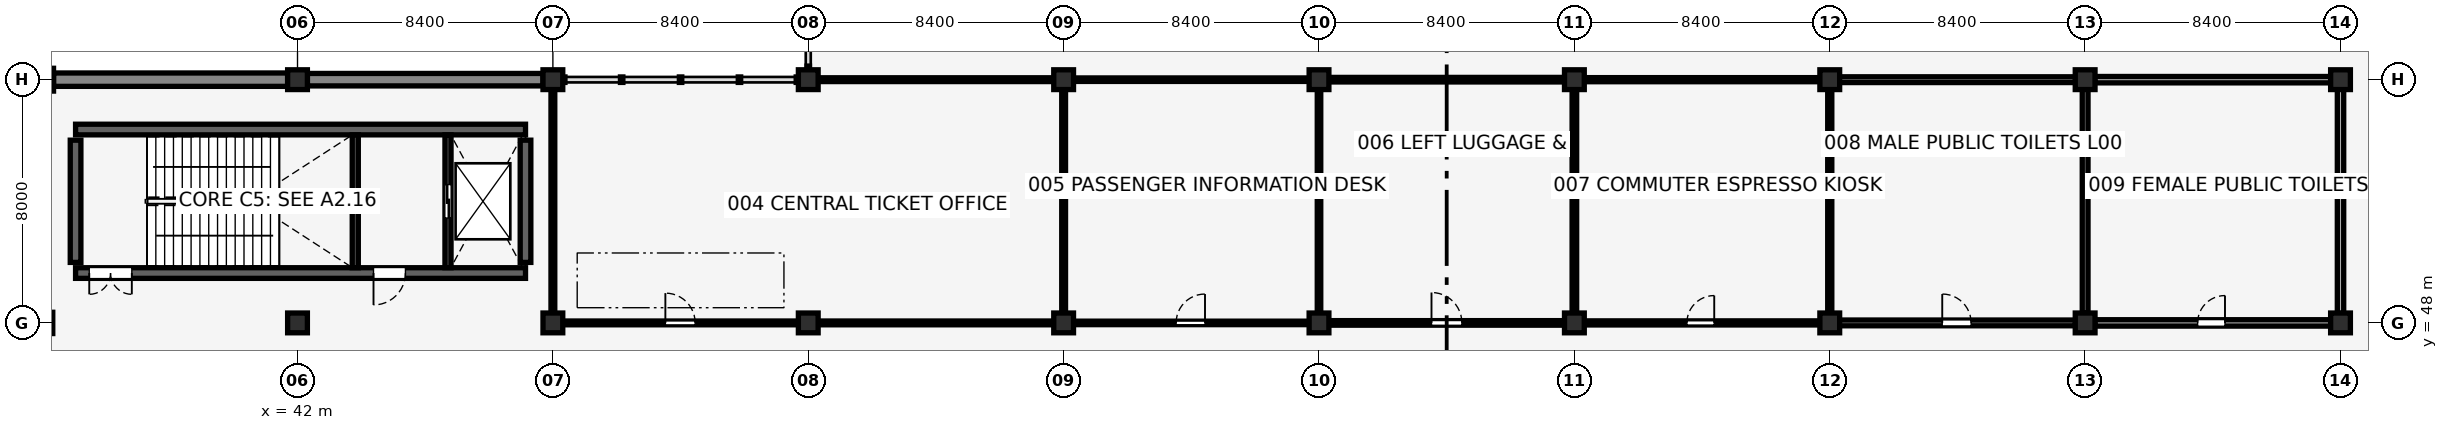
"""IFC4 building model, lengths in metres.
Left out: names, types, materials, properties, quantities, classifications, styles, units other than length and angle.
Written with IfcOpenShell. Run it as: python <this file> out.ifc"""

import sys

from ifc_helpers import new_model, si_unit, direction, frame, frame_2d, origin, origin_2d, place, context, subcontext, project, spatial, rectangle, circle, extrude, element, fill, save


model = new_model("IFC4")
c1 = context("Model", 3, precision=1e-05, world=origin(), true_north=direction((0.0, 1.0)))
c2 = subcontext(c1, "Body", "Model", "MODEL_VIEW")
j1 = project(units=[si_unit("LENGTHUNIT", "METRE"), si_unit("PLANEANGLEUNIT", "RADIAN")], contexts=[c1])
p1 = place(None, origin())
s1 = spatial("IfcSite", under=j1, at=p1, CompositionType="ELEMENT")
p2 = place(p1, origin())
s2 = spatial("IfcBuilding", under=s1, at=p2, CompositionType="ELEMENT")
p3 = place(p2, origin())
s3 = spatial("IfcBuildingStorey", under=s2, at=p3, CompositionType="ELEMENT", Elevation=0.0)
p4 = place(p3, frame((34.7, 49.64, 0.0), z_axis=(0.0, 0.0, 1.0), x_axis=(1.0, 0.0, 0.0)))
e1 = element("IfcWall", 1, at=p4, inside=s3, PredefinedType="SHEAR", context=c2, shape_type="SweptSolid", body=[
    extrude(rectangle(XDim=14.8, YDim=0.35, at=frame_2d((7.4, 0.0))), origin(), (0.0, 0.0, 1.0), 5.15),
])
p5 = place(p4, frame((1.85, 0.0, 0.0), z_axis=(0.0, 0.0, 1.0), x_axis=(-1.0, 0.0, 0.0)))
e2 = element("IfcOpeningElement", 2, at=p5, cuts=e1, PredefinedType="OPENING", context=c2, shape_type="SweptSolid", body=[
    extrude(rectangle(XDim=1.4, YDim=2.15, at=frame_2d((0.7, 1.075))), frame((0.0, 0.185, 0.0), z_axis=(0.0, -1.0, 0.0), x_axis=(1.0, 0.0, 0.0)), (0.0, 0.0, 1.0), 0.37),
])
p6 = place(p4, frame((10.85, 0.0, 0.0), z_axis=(0.0, 0.0, 1.0), x_axis=(-1.0, 0.0, 0.0)))
e3 = element("IfcOpeningElement", 3, at=p6, cuts=e1, PredefinedType="OPENING", context=c2, shape_type="SweptSolid", body=[
    extrude(rectangle(XDim=1.05, YDim=2.15, at=frame_2d((0.525, 1.075))), frame((0.0, 0.185, 0.0), z_axis=(0.0, -1.0, 0.0), x_axis=(1.0, 0.0, 0.0)), (0.0, 0.0, 1.0), 0.37),
])
p7 = place(p3, frame((34.7, 54.36, 0.0), z_axis=(0.0, 0.0, 1.0), x_axis=(1.0, 0.0, 0.0)))
e4 = element("IfcWall", 4, at=p7, inside=s3, PredefinedType="SHEAR", context=c2, shape_type="SweptSolid", body=[
    extrude(rectangle(XDim=14.8, YDim=0.35, at=frame_2d((7.4, 0.0))), origin(), (0.0, 0.0, 1.0), 5.15),
])
for number, where, z_axis, x_axis in (
    (5, (34.7, 49.99, 0.0), (0.0, 0.0, 1.0), (0.0, 1.0, 0.0)),
    (6, (49.5, 49.99, 0.0), (0.0, 0.0, 1.0), (0.0, 1.0, 0.0)),
):
    element("IfcWall", number, at=place(p3, frame(where, z_axis=z_axis, x_axis=x_axis)), inside=s3, PredefinedType="SHEAR", context=c2, shape_type="SweptSolid", body=[
        extrude(rectangle(XDim=4.02, YDim=0.35, at=frame_2d((2.01, 0.0))), origin(), (0.0, 0.0, 1.0), 5.15),
    ])
p8 = place(p3, frame((33.6, 48.0, 0.0), z_axis=(0.0, 0.0, 1.0), x_axis=(1.0, 0.0, 0.0)))
e7 = element("IfcColumn", 7, at=p8, inside=s3, PredefinedType="COLUMN", context=c2, shape_type="SweptSolid", body=[
    extrude(rectangle(XDim=0.7, YDim=0.7, at=origin_2d()), origin(), (0.0, 0.0, 1.0), 5.15),
])
p9 = place(p3, frame((33.6, 56.0, 0.0), z_axis=(0.0, 0.0, 1.0), x_axis=(1.0, 0.0, 0.0)))
e8 = element("IfcColumn", 8, at=p9, inside=s3, PredefinedType="COLUMN", context=c2, shape_type="SweptSolid", body=[
    extrude(rectangle(XDim=0.75, YDim=0.75, at=origin_2d()), origin(), (0.0, 0.0, 1.0), 5.15),
])
for number, where, z_axis, x_axis in (
    (9, (42.0, 48.0, 0.0), (0.0, 0.0, 1.0), (1.0, 0.0, 0.0)),
    (10, (42.0, 56.0, 0.0), (0.0, 0.0, 1.0), (1.0, 0.0, 0.0)),
    (11, (50.4, 48.0, 0.0), (0.0, 0.0, 1.0), (1.0, 0.0, 0.0)),
    (12, (50.4, 56.0, 0.0), (0.0, 0.0, 1.0), (1.0, 0.0, 0.0)),
    (13, (58.8, 48.0, 0.0), (0.0, 0.0, 1.0), (1.0, 0.0, 0.0)),
    (14, (58.8, 56.0, 0.0), (0.0, 0.0, 1.0), (1.0, 0.0, 0.0)),
    (15, (67.2, 48.0, 0.0), (0.0, 0.0, 1.0), (1.0, 0.0, 0.0)),
    (16, (67.2, 56.0, 0.0), (0.0, 0.0, 1.0), (1.0, 0.0, 0.0)),
    (17, (75.6, 48.0, 0.0), (0.0, 0.0, 1.0), (1.0, 0.0, 0.0)),
    (18, (75.6, 56.0, 0.0), (0.0, 0.0, 1.0), (1.0, 0.0, 0.0)),
    (19, (84.0, 48.0, 0.0), (0.0, 0.0, 1.0), (1.0, 0.0, 0.0)),
    (20, (84.0, 56.0, 0.0), (0.0, 0.0, 1.0), (1.0, 0.0, 0.0)),
    (21, (92.4, 48.0, 0.0), (0.0, 0.0, 1.0), (1.0, 0.0, 0.0)),
    (22, (92.4, 56.0, 0.0), (0.0, 0.0, 1.0), (1.0, 0.0, 0.0)),
    (23, (100.8, 48.0, 0.0), (0.0, 0.0, 1.0), (1.0, 0.0, 0.0)),
    (24, (100.8, 56.0, 0.0), (0.0, 0.0, 1.0), (1.0, 0.0, 0.0)),
    (25, (109.2, 48.0, 0.0), (0.0, 0.0, 1.0), (1.0, 0.0, 0.0)),
    (26, (109.2, 56.0, 0.0), (0.0, 0.0, 1.0), (1.0, 0.0, 0.0)),
):
    element("IfcColumn", number, at=place(p3, frame(where, z_axis=z_axis, x_axis=x_axis)), inside=s3, PredefinedType="COLUMN", context=c2, shape_type="SweptSolid", body=[
        extrude(circle(Radius=0.325, at=origin_2d()), origin(), (0.0, 0.0, 1.0), 5.15),
    ])
p10 = place(p3, frame((33.975, 56.0, 0.0), z_axis=(0.0, 0.0, 1.0), x_axis=(1.0, 0.0, 0.0)))
e27 = element("IfcWall", 27, at=p10, inside=s3, PredefinedType="SOLIDWALL", context=c2, shape_type="SweptSolid", body=[
    extrude(rectangle(XDim=7.7, YDim=0.44, at=frame_2d((3.85, 0.0))), origin(), (0.0, 0.0, 1.0), 4.74),
])
p11 = place(p3, frame((42.325, 56.0, 0.0), z_axis=(0.0, 0.0, 1.0), x_axis=(1.0, 0.0, 0.0)))
e28 = element("IfcWall", 28, at=p11, inside=s3, PredefinedType="SOLIDWALL", context=c2, shape_type="SweptSolid", body=[
    extrude(rectangle(XDim=7.75, YDim=0.41, at=frame_2d((3.875, 0.0))), origin(), (0.0, 0.0, 1.0), 4.74),
])
p12 = place(p3, frame((43.9, 49.815, 0.0), z_axis=(0.0, 0.0, 1.0), x_axis=(0.0, 1.0, 0.0)))
e29 = element("IfcWall", 29, at=p12, inside=s3, PredefinedType="SHEAR", context=c2, shape_type="SweptSolid", body=[
    extrude(rectangle(XDim=4.37, YDim=0.2, at=frame_2d((2.185, 0.0))), origin(), (0.0, 0.0, 1.0), 5.15),
])
p13 = place(p3, frame((46.95, 49.815, 0.0), z_axis=(0.0, 0.0, 1.0), x_axis=(0.0, 1.0, 0.0)))
e30 = element("IfcWall", 30, at=p13, inside=s3, PredefinedType="SHEAR", context=c2, shape_type="SweptSolid", body=[
    extrude(rectangle(XDim=4.37, YDim=0.2, at=frame_2d((2.185, 0.0))), origin(), (0.0, 0.0, 1.0), 5.15),
])
p14 = place(p13, frame((1.635, 0.0, 0.0), z_axis=(0.0, 0.0, 1.0), x_axis=(1.0, 0.0, 0.0)))
e31 = element("IfcOpeningElement", 31, at=p14, cuts=e30, PredefinedType="OPENING", context=c2, shape_type="SweptSolid", body=[
    extrude(rectangle(XDim=1.1, YDim=2.15, at=frame_2d((0.55, 1.075))), frame((0.0, 0.11, 0.0), z_axis=(0.0, -1.0, 0.0), x_axis=(1.0, 0.0, 0.0)), (0.0, 0.0, 1.0), 0.22),
])
p15 = place(p3, frame((50.715, 48.0, 0.0), z_axis=(0.0, 0.0, 1.0), x_axis=(1.0, 0.0, 0.0)))
e32 = element("IfcWall", 32, at=p15, inside=s3, PredefinedType="PARTITIONING", context=c2, shape_type="SweptSolid", body=[
    extrude(rectangle(XDim=7.77, YDim=0.125, at=frame_2d((3.885, 0.0))), origin(), (0.0, 0.0, 1.0), 4.605),
])
p16 = place(p15, frame((3.385, 0.0, 0.0), z_axis=(0.0, 0.0, 1.0), x_axis=(1.0, 0.0, 0.0)))
e33 = element("IfcOpeningElement", 33, at=p16, cuts=e32, PredefinedType="OPENING", context=c2, shape_type="SweptSolid", body=[
    extrude(rectangle(XDim=0.98, YDim=2.15, at=frame_2d((0.49, 1.075))), frame((0.0, 0.073, 0.0), z_axis=(0.0, -1.0, 0.0), x_axis=(1.0, 0.0, 0.0)), (0.0, 0.0, 1.0), 0.145),
])
p17 = place(p3, frame((67.515, 48.0, 0.0), z_axis=(0.0, 0.0, 1.0), x_axis=(1.0, 0.0, 0.0)))
e34 = element("IfcWall", 34, at=p17, inside=s3, PredefinedType="PARTITIONING", context=c2, shape_type="SweptSolid", body=[
    extrude(rectangle(XDim=7.77, YDim=0.115, at=frame_2d((3.885, 0.0))), origin(), (0.0, 0.0, 1.0), 4.605),
])
p18 = place(p17, frame((3.385, 0.0, 0.0), z_axis=(0.0, 0.0, 1.0), x_axis=(1.0, 0.0, 0.0)))
e35 = element("IfcOpeningElement", 35, at=p18, cuts=e34, PredefinedType="OPENING", context=c2, shape_type="SweptSolid", body=[
    extrude(rectangle(XDim=0.95, YDim=2.15, at=frame_2d((0.475, 1.075))), frame((0.0, 0.067, 0.0), z_axis=(0.0, -1.0, 0.0), x_axis=(1.0, 0.0, 0.0)), (0.0, 0.0, 1.0), 0.135),
])
p19 = place(p3, frame((75.915, 48.0, 0.0), z_axis=(0.0, 0.0, 1.0), x_axis=(1.0, 0.0, 0.0)))
e36 = element("IfcWall", 36, at=p19, inside=s3, PredefinedType="PARTITIONING", context=c2, shape_type="SweptSolid", body=[
    extrude(rectangle(XDim=7.77, YDim=0.15, at=frame_2d((3.885, 0.0))), origin(), (0.0, 0.0, 1.0), 4.605),
])
p20 = place(p19, frame((3.385, 0.0, 0.0), z_axis=(0.0, 0.0, 1.0), x_axis=(1.0, 0.0, 0.0)))
e37 = element("IfcOpeningElement", 37, at=p20, cuts=e36, PredefinedType="OPENING", context=c2, shape_type="SweptSolid", body=[
    extrude(rectangle(XDim=1.0, YDim=2.15, at=frame_2d((0.5, 1.075))), frame((0.0, 0.085, 0.0), z_axis=(0.0, -1.0, 0.0), x_axis=(1.0, 0.0, 0.0)), (0.0, 0.0, 1.0), 0.17),
])
p21 = place(p3, frame((84.315, 48.0, 0.0), z_axis=(0.0, 0.0, 1.0), x_axis=(1.0, 0.0, 0.0)))
e38 = element("IfcWall", 38, at=p21, inside=s3, PredefinedType="PARTITIONING", context=c2, shape_type="SweptSolid", body=[
    extrude(rectangle(XDim=7.77, YDim=0.135, at=frame_2d((3.885, 0.0))), origin(), (0.0, 0.0, 1.0), 4.605),
])
p22 = place(p21, frame((3.385, 0.0, 0.0), z_axis=(0.0, 0.0, 1.0), x_axis=(1.0, 0.0, 0.0)))
e39 = element("IfcOpeningElement", 39, at=p22, cuts=e38, PredefinedType="OPENING", context=c2, shape_type="SweptSolid", body=[
    extrude(rectangle(XDim=0.9, YDim=2.1, at=frame_2d((0.45, 1.05))), frame((0.0, 0.077, 0.0), z_axis=(0.0, -1.0, 0.0), x_axis=(1.0, 0.0, 0.0)), (0.0, 0.0, 1.0), 0.155),
])
p23 = place(p3, frame((92.715, 48.0, 0.0), z_axis=(0.0, 0.0, 1.0), x_axis=(1.0, 0.0, 0.0)))
e40 = element("IfcWall", 40, at=p23, inside=s3, PredefinedType="PLUMBINGWALL", context=c2, shape_type="SweptSolid", body=[
    extrude(rectangle(XDim=7.77, YDim=0.19, at=frame_2d((3.885, 0.0))), origin(), (0.0, 0.0, 1.0), 4.605),
])
p24 = place(p23, frame((3.385, 0.0, 0.0), z_axis=(0.0, 0.0, 1.0), x_axis=(1.0, 0.0, 0.0)))
e41 = element("IfcOpeningElement", 41, at=p24, cuts=e40, PredefinedType="OPENING", context=c2, shape_type="SweptSolid", body=[
    extrude(rectangle(XDim=0.95, YDim=2.15, at=frame_2d((0.475, 1.075))), frame((0.0, 0.105, 0.0), z_axis=(0.0, -1.0, 0.0), x_axis=(1.0, 0.0, 0.0)), (0.0, 0.0, 1.0), 0.21),
])
p25 = place(p3, frame((101.115, 48.0, 0.0), z_axis=(0.0, 0.0, 1.0), x_axis=(1.0, 0.0, 0.0)))
e42 = element("IfcWall", 42, at=p25, inside=s3, PredefinedType="PLUMBINGWALL", context=c2, shape_type="SweptSolid", body=[
    extrude(rectangle(XDim=7.77, YDim=0.21, at=frame_2d((3.885, 0.0))), origin(), (0.0, 0.0, 1.0), 4.605),
])
p26 = place(p25, frame((3.385, 0.0, 0.0), z_axis=(0.0, 0.0, 1.0), x_axis=(1.0, 0.0, 0.0)))
e43 = element("IfcOpeningElement", 43, at=p26, cuts=e42, PredefinedType="OPENING", context=c2, shape_type="SweptSolid", body=[
    extrude(rectangle(XDim=0.9, YDim=2.15, at=frame_2d((0.45, 1.075))), frame((0.0, 0.115, 0.0), z_axis=(0.0, -1.0, 0.0), x_axis=(1.0, 0.0, 0.0)), (0.0, 0.0, 1.0), 0.23),
])
for number, where, z_axis, x_axis in (
    (44, (59.115, 48.0, 0.0), (0.0, 0.0, 1.0), (1.0, 0.0, 0.0)),
    (45, (59.115, 56.0, 0.0), (0.0, 0.0, 1.0), (1.0, 0.0, 0.0)),
):
    element("IfcWall", number, at=place(p3, frame(where, z_axis=z_axis, x_axis=x_axis)), inside=s3, PredefinedType="PARTITIONING", context=c2, shape_type="SweptSolid", body=[
        extrude(rectangle(XDim=7.77, YDim=0.125, at=frame_2d((3.885, 0.0))), origin(), (0.0, 0.0, 1.0), 4.605),
    ])
for number, where, z_axis, x_axis in (
    (46, (50.4, 48.315, 0.0), (0.0, 0.0, 1.0), (0.0, 1.0, 0.0)),
    (47, (67.2, 48.315, 0.0), (0.0, 0.0, 1.0), (0.0, 1.0, 0.0)),
):
    element("IfcWall", number, at=place(p3, frame(where, z_axis=z_axis, x_axis=x_axis)), inside=s3, PredefinedType="PARTITIONING", context=c2, shape_type="SweptSolid", body=[
        extrude(rectangle(XDim=7.37, YDim=0.125, at=frame_2d((3.685, 0.0))), origin(), (0.0, 0.0, 1.0), 4.542),
    ])
p27 = place(p3, frame((67.515, 56.0, 0.0), z_axis=(0.0, 0.0, 1.0), x_axis=(1.0, 0.0, 0.0)))
e48 = element("IfcWall", 48, at=p27, inside=s3, PredefinedType="PARTITIONING", context=c2, shape_type="SweptSolid", body=[
    extrude(rectangle(XDim=7.77, YDim=0.115, at=frame_2d((3.885, 0.0))), origin(), (0.0, 0.0, 1.0), 4.605),
])
p28 = place(p3, frame((75.6, 48.315, 0.0), z_axis=(0.0, 0.0, 1.0), x_axis=(0.0, 1.0, 0.0)))
e49 = element("IfcWall", 49, at=p28, inside=s3, PredefinedType="PARTITIONING", context=c2, shape_type="SweptSolid", body=[
    extrude(rectangle(XDim=7.37, YDim=0.115, at=frame_2d((3.685, 0.0))), origin(), (0.0, 0.0, 1.0), 4.542),
])
p29 = place(p3, frame((75.915, 56.0, 0.0), z_axis=(0.0, 0.0, 1.0), x_axis=(1.0, 0.0, 0.0)))
e50 = element("IfcWall", 50, at=p29, inside=s3, PredefinedType="PARTITIONING", context=c2, shape_type="SweptSolid", body=[
    extrude(rectangle(XDim=7.77, YDim=0.15, at=frame_2d((3.885, 0.0))), origin(), (0.0, 0.0, 1.0), 4.605),
])
p30 = place(p3, frame((84.0, 48.315, 0.0), z_axis=(0.0, 0.0, 1.0), x_axis=(0.0, 1.0, 0.0)))
e51 = element("IfcWall", 51, at=p30, inside=s3, PredefinedType="PARTITIONING", context=c2, shape_type="SweptSolid", body=[
    extrude(rectangle(XDim=7.37, YDim=0.15, at=frame_2d((3.685, 0.0))), origin(), (0.0, 0.0, 1.0), 4.542),
])
p31 = place(p3, frame((84.315, 56.0, 0.0), z_axis=(0.0, 0.0, 1.0), x_axis=(1.0, 0.0, 0.0)))
e52 = element("IfcWall", 52, at=p31, inside=s3, PredefinedType="PARTITIONING", context=c2, shape_type="SweptSolid", body=[
    extrude(rectangle(XDim=7.77, YDim=0.135, at=frame_2d((3.885, 0.0))), origin(), (0.0, 0.0, 1.0), 4.605),
])
p32 = place(p3, frame((92.4, 48.315, 0.0), z_axis=(0.0, 0.0, 1.0), x_axis=(0.0, 1.0, 0.0)))
e53 = element("IfcWall", 53, at=p32, inside=s3, PredefinedType="PARTITIONING", context=c2, shape_type="SweptSolid", body=[
    extrude(rectangle(XDim=7.37, YDim=0.135, at=frame_2d((3.685, 0.0))), origin(), (0.0, 0.0, 1.0), 4.542),
])
p33 = place(p3, frame((92.715, 56.0, 0.0), z_axis=(0.0, 0.0, 1.0), x_axis=(1.0, 0.0, 0.0)))
e54 = element("IfcWall", 54, at=p33, inside=s3, PredefinedType="PLUMBINGWALL", context=c2, shape_type="SweptSolid", body=[
    extrude(rectangle(XDim=7.77, YDim=0.19, at=frame_2d((3.885, 0.0))), origin(), (0.0, 0.0, 1.0), 4.605),
])
p34 = place(p3, frame((100.8, 48.315, 0.0), z_axis=(0.0, 0.0, 1.0), x_axis=(0.0, 1.0, 0.0)))
e55 = element("IfcWall", 55, at=p34, inside=s3, PredefinedType="PLUMBINGWALL", context=c2, shape_type="SweptSolid", body=[
    extrude(rectangle(XDim=7.37, YDim=0.19, at=frame_2d((3.685, 0.0))), origin(), (0.0, 0.0, 1.0), 4.542),
])
p35 = place(p3, frame((101.115, 56.0, 0.0), z_axis=(0.0, 0.0, 1.0), x_axis=(1.0, 0.0, 0.0)))
e56 = element("IfcWall", 56, at=p35, inside=s3, PredefinedType="PLUMBINGWALL", context=c2, shape_type="SweptSolid", body=[
    extrude(rectangle(XDim=7.77, YDim=0.21, at=frame_2d((3.885, 0.0))), origin(), (0.0, 0.0, 1.0), 4.605),
])
p36 = place(p3, frame((109.2, 48.315, 0.0), z_axis=(0.0, 0.0, 1.0), x_axis=(0.0, 1.0, 0.0)))
e57 = element("IfcWall", 57, at=p36, inside=s3, PredefinedType="PLUMBINGWALL", context=c2, shape_type="SweptSolid", body=[
    extrude(rectangle(XDim=7.37, YDim=0.21, at=frame_2d((3.685, 0.0))), origin(), (0.0, 0.0, 1.0), 4.542),
])
p37 = place(p5, origin())
e58 = element("IfcDoor", 58, at=p37, inside=s3, OperationType="DOUBLE_DOOR_SINGLE_SWING", PredefinedType="DOOR", context=c2, shape_type="SweptSolid", body=[
    extrude(rectangle(XDim=1.4, YDim=2.15, at=frame_2d((0.7, 1.075))), frame((0.0, 0.025, 0.0), z_axis=(0.0, -1.0, 0.0), x_axis=(1.0, 0.0, 0.0)), (0.0, 0.0, 1.0), 0.05),
])
fill(e2, e58)
p38 = place(p6, origin())
e59 = element("IfcDoor", 59, at=p38, inside=s3, OperationType="SINGLE_SWING_RIGHT", PredefinedType="DOOR", context=c2, shape_type="SweptSolid", body=[
    extrude(rectangle(XDim=1.05, YDim=2.15, at=frame_2d((0.525, 1.075))), frame((0.0, 0.025, 0.0), z_axis=(0.0, -1.0, 0.0), x_axis=(1.0, 0.0, 0.0)), (0.0, 0.0, 1.0), 0.05),
])
fill(e3, e59)
p39 = place(p14, origin())
e60 = element("IfcDoor", 60, at=p39, inside=s3, OperationType="DOUBLE_DOOR_SLIDING", PredefinedType="DOOR", context=c2, shape_type="SweptSolid", body=[
    extrude(rectangle(XDim=1.1, YDim=2.15, at=frame_2d((0.55, 1.075))), frame((0.0, 0.025, 0.0), z_axis=(0.0, -1.0, 0.0), x_axis=(1.0, 0.0, 0.0)), (0.0, 0.0, 1.0), 0.05),
])
fill(e31, e60)
p40 = place(p16, origin())
e61 = element("IfcDoor", 61, at=p40, inside=s3, OperationType="SINGLE_SWING_LEFT", PredefinedType="DOOR", context=c2, shape_type="SweptSolid", body=[
    extrude(rectangle(XDim=0.98, YDim=2.15, at=frame_2d((0.49, 1.075))), frame((0.0, 0.025, 0.0), z_axis=(0.0, -1.0, 0.0), x_axis=(1.0, 0.0, 0.0)), (0.0, 0.0, 1.0), 0.05),
])
fill(e33, e61)
p41 = place(p18, origin())
e62 = element("IfcDoor", 62, at=p41, inside=s3, OperationType="SINGLE_SWING_RIGHT", PredefinedType="DOOR", context=c2, shape_type="SweptSolid", body=[
    extrude(rectangle(XDim=0.95, YDim=2.15, at=frame_2d((0.475, 1.075))), frame((0.0, 0.025, 0.0), z_axis=(0.0, -1.0, 0.0), x_axis=(1.0, 0.0, 0.0)), (0.0, 0.0, 1.0), 0.05),
])
fill(e35, e62)
p42 = place(p20, origin())
e63 = element("IfcDoor", 63, at=p42, inside=s3, OperationType="SINGLE_SWING_LEFT", PredefinedType="DOOR", context=c2, shape_type="SweptSolid", body=[
    extrude(rectangle(XDim=1.0, YDim=2.15, at=frame_2d((0.5, 1.075))), frame((0.0, 0.025, 0.0), z_axis=(0.0, -1.0, 0.0), x_axis=(1.0, 0.0, 0.0)), (0.0, 0.0, 1.0), 0.05),
])
fill(e37, e63)
p43 = place(p22, origin())
e64 = element("IfcDoor", 64, at=p43, inside=s3, OperationType="SINGLE_SWING_RIGHT", PredefinedType="DOOR", context=c2, shape_type="SweptSolid", body=[
    extrude(rectangle(XDim=0.9, YDim=2.1, at=frame_2d((0.45, 1.05))), frame((0.0, 0.025, 0.0), z_axis=(0.0, -1.0, 0.0), x_axis=(1.0, 0.0, 0.0)), (0.0, 0.0, 1.0), 0.05),
])
fill(e39, e64)
p44 = place(p24, origin())
e65 = element("IfcDoor", 65, at=p44, inside=s3, OperationType="SINGLE_SWING_LEFT", PredefinedType="DOOR", context=c2, shape_type="SweptSolid", body=[
    extrude(rectangle(XDim=0.95, YDim=2.15, at=frame_2d((0.475, 1.075))), frame((0.0, 0.025, 0.0), z_axis=(0.0, -1.0, 0.0), x_axis=(1.0, 0.0, 0.0)), (0.0, 0.0, 1.0), 0.05),
])
fill(e41, e65)
p45 = place(p26, origin())
e66 = element("IfcDoor", 66, at=p45, inside=s3, OperationType="SINGLE_SWING_RIGHT", PredefinedType="DOOR", context=c2, shape_type="SweptSolid", body=[
    extrude(rectangle(XDim=0.9, YDim=2.15, at=frame_2d((0.45, 1.075))), frame((0.0, 0.025, 0.0), z_axis=(0.0, -1.0, 0.0), x_axis=(1.0, 0.0, 0.0)), (0.0, 0.0, 1.0), 0.05),
])
fill(e43, e66)
save(model, sys.argv[1])
